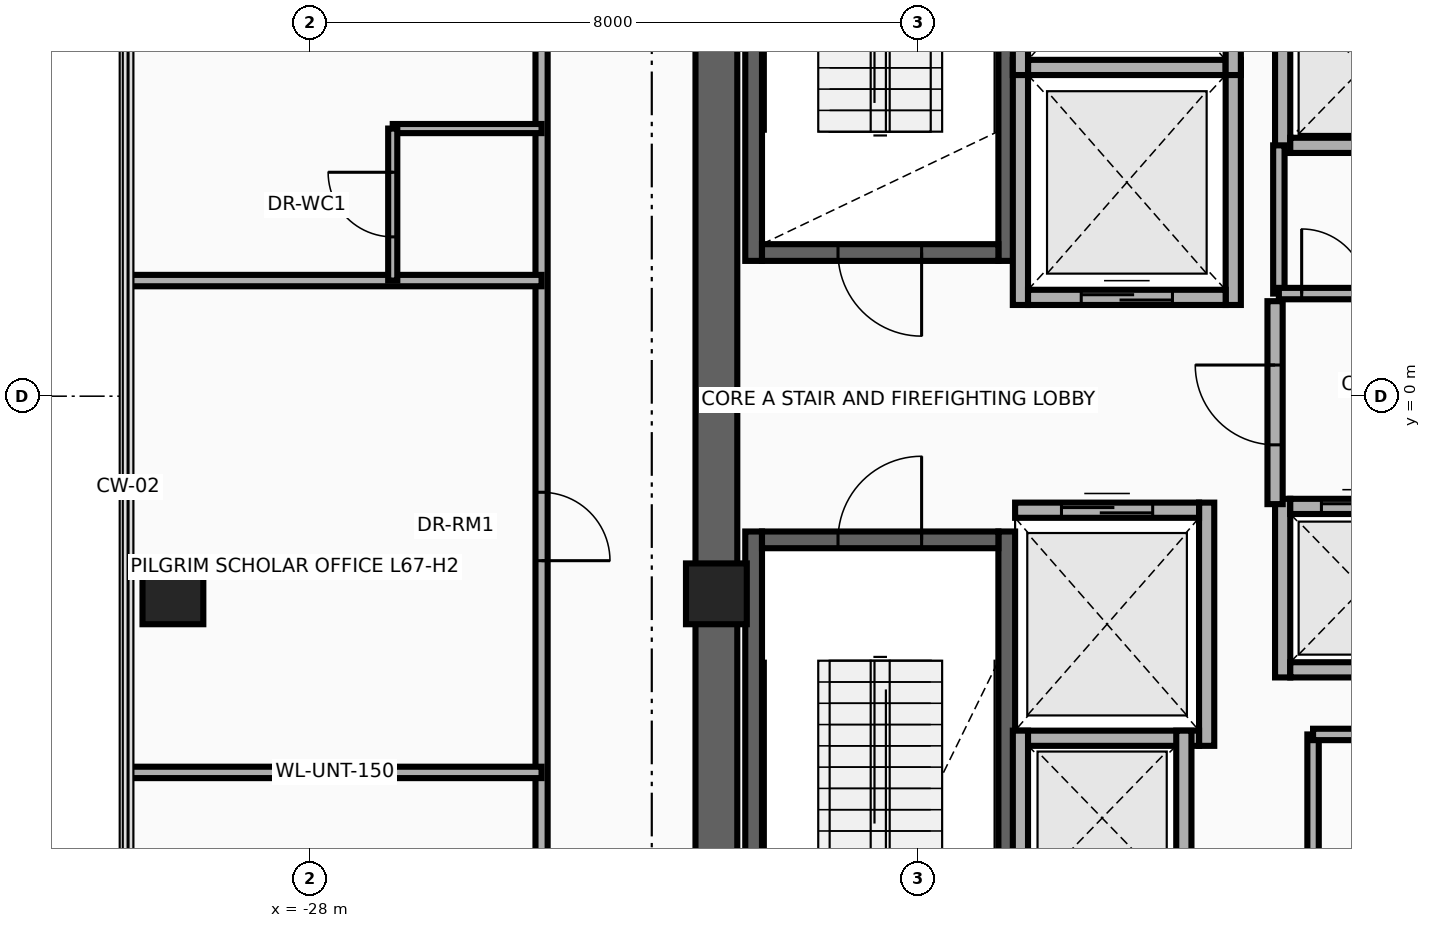
"""IFC4 building model, lengths in metres.
Left out: names, types, materials, properties, quantities, classifications, styles, units other than length and angle.
Written with IfcOpenShell. Run it as: python <this file> out.ifc"""

import sys

from ifc_helpers import new_model, si_unit, direction, frame, frame_2d, origin, origin_2d, place, context, subcontext, project, spatial, rectangle, extrude, source, transform, mapped, element, fill, save


model = new_model("IFC4")
c1 = context("Model", 3, precision=1e-05, world=origin(), true_north=direction((0.0, 1.0)))
c2 = subcontext(c1, "Body", "Model", "MODEL_VIEW")
j1 = project(units=[si_unit("LENGTHUNIT", "METRE"), si_unit("PLANEANGLEUNIT", "RADIAN")], contexts=[c1])
p1 = place(None, origin())
s1 = spatial("IfcSite", under=j1, at=p1, CompositionType="ELEMENT")
p2 = place(p1, origin())
s2 = spatial("IfcBuilding", under=s1, at=p2, CompositionType="ELEMENT")
p3 = place(p2, frame((0.0, 0.0, 258.0)))
s3 = spatial("IfcBuildingStorey", under=s2, at=p3, CompositionType="ELEMENT", Elevation=258.0)
for number, where, z_axis, x_axis in (
    (1, (-22.16, 1.78, 0.0), (0.0, 0.0, 1.0), (0.0, 1.0, 0.0)),
    (2, (-18.83, 1.78, 0.0), (0.0, 0.0, 1.0), (0.0, 1.0, 0.0)),
):
    element("IfcWall", number, at=place(p3, frame(where, z_axis=z_axis, x_axis=x_axis)), inside=s3, PredefinedType="SHEAR", context=c2, shape_type="SweptSolid", body=[
        extrude(rectangle(XDim=8.745, YDim=0.22, at=frame_2d((4.373, 0.0))), origin(), (0.0, 0.0, 1.0), 3.26),
    ])
p4 = place(p3, frame((-22.05, 1.89, 0.0), z_axis=(0.0, 0.0, 1.0), x_axis=(1.0, 0.0, 0.0)))
e3 = element("IfcWall", 3, at=p4, inside=s3, PredefinedType="SHEAR", context=c2, shape_type="SweptSolid", body=[
    extrude(rectangle(XDim=3.11, YDim=0.22, at=frame_2d((1.555, 0.0))), origin(), (0.0, 0.0, 1.0), 3.26),
])
p5 = place(p4, frame((1.0, 0.0, 0.0)))
e4 = element("IfcOpeningElement", 4, at=p5, cuts=e3, PredefinedType="OPENING", context=c2, shape_type="SweptSolid", body=[
    extrude(rectangle(XDim=1.1, YDim=2.15, at=frame_2d((0.55, 1.075))), frame((0.0, 0.125, 0.0), z_axis=(0.0, -1.0, 0.0), x_axis=(1.0, 0.0, 0.0)), (0.0, 0.0, 1.0), 0.25),
])
for number, where, z_axis, x_axis in (
    (5, (-22.16, -10.525, 0.0), (0.0, 0.0, 1.0), (0.0, 1.0, 0.0)),
    (6, (-18.83, -10.525, 0.0), (0.0, 0.0, 1.0), (0.0, 1.0, 0.0)),
):
    element("IfcWall", number, at=place(p3, frame(where, z_axis=z_axis, x_axis=x_axis)), inside=s3, PredefinedType="SHEAR", context=c2, shape_type="SweptSolid", body=[
        extrude(rectangle(XDim=8.745, YDim=0.22, at=frame_2d((4.373, 0.0))), origin(), (0.0, 0.0, 1.0), 3.26),
    ])
p6 = place(p3, frame((-22.05, -1.89, 0.0), z_axis=(0.0, 0.0, 1.0), x_axis=(1.0, 0.0, 0.0)))
e7 = element("IfcWall", 7, at=p6, inside=s3, PredefinedType="SHEAR", context=c2, shape_type="SweptSolid", body=[
    extrude(rectangle(XDim=3.11, YDim=0.22, at=frame_2d((1.555, 0.0))), origin(), (0.0, 0.0, 1.0), 3.26),
])
p7 = place(p6, frame((1.0, 0.0, 0.0)))
e8 = element("IfcOpeningElement", 8, at=p7, cuts=e7, PredefinedType="OPENING", context=c2, shape_type="SweptSolid", body=[
    extrude(rectangle(XDim=1.1, YDim=2.15, at=frame_2d((0.55, 1.075))), frame((0.0, 0.125, 0.0), z_axis=(0.0, -1.0, 0.0), x_axis=(1.0, 0.0, 0.0)), (0.0, 0.0, 1.0), 0.25),
])
p8 = place(p3, frame((-22.65, -11.075, 0.0), z_axis=(0.0, 0.0, 1.0), x_axis=(0.0, 1.0, 0.0)))
e9 = element("IfcWall", 9, at=p8, inside=s3, PredefinedType="SHEAR", context=c2, shape_type="SweptSolid", body=[
    extrude(rectangle(XDim=22.15, YDim=0.55, at=frame_2d((11.075, 0.0))), origin(), (0.0, 0.0, 1.0), 3.26),
])
m1 = source(origin(), c2, "Body", "SweptSolid", [
    extrude(rectangle(XDim=0.8, YDim=0.8, at=origin_2d()), origin(), (0.0, 0.0, 1.0), 3.5),
])
for number, where, z_axis, x_axis in (
    (10, (-29.8, -2.6, 0.0), (0.0, 0.0, 1.0), (1.0, 0.0, 0.0)),
    (11, (-22.65, -2.6, 0.0), (0.0, 0.0, 1.0), (1.0, 0.0, 0.0)),
):
    element("IfcColumn", number, at=place(p3, frame(where, z_axis=z_axis, x_axis=x_axis)), inside=s3, PredefinedType="COLUMN", context=c2, shape_type="MappedRepresentation", body=[
        mapped(m1, transform((0.0, 0.0, 0.0), x_axis=(1.0, 0.0, 0.0), y_axis=(0.0, 1.0, 0.0), z_axis=(0.0, 0.0, 1.0), scale=1.0)),
    ])
for number, where, z_axis, x_axis in (
    (12, (-18.65, 1.2, 0.0), (0.0, 0.0, 1.0), (0.0, 1.0, 0.0)),
    (13, (-15.85, 1.2, 0.0), (0.0, 0.0, 1.0), (0.0, 1.0, 0.0)),
):
    element("IfcWall", number, at=place(p3, frame(where, z_axis=z_axis, x_axis=x_axis)), inside=s3, PredefinedType="MOVABLE", context=c2, shape_type="SweptSolid", body=[
        extrude(rectangle(XDim=3.225, YDim=0.2, at=frame_2d((1.613, 0.0))), origin(), (0.0, 0.0, 1.0), 3.26),
    ])
p9 = place(p3, frame((-18.55, 1.3, 0.0), z_axis=(0.0, 0.0, 1.0), x_axis=(1.0, 0.0, 0.0)))
e14 = element("IfcWall", 14, at=p9, inside=s3, PredefinedType="MOVABLE", context=c2, shape_type="SweptSolid", body=[
    extrude(rectangle(XDim=2.6, YDim=0.2, at=frame_2d((1.3, 0.0))), origin(), (0.0, 0.0, 1.0), 3.26),
])
p10 = place(p9, frame((0.7, 0.0, 0.0)))
e15 = element("IfcOpeningElement", 15, at=p10, cuts=e14, PredefinedType="OPENING", context=c2, shape_type="SweptSolid", body=[
    extrude(rectangle(XDim=1.2, YDim=2.1, at=frame_2d((0.6, 1.05))), frame((0.0, 0.115, 0.0), z_axis=(0.0, -1.0, 0.0), x_axis=(1.0, 0.0, 0.0)), (0.0, 0.0, 1.0), 0.23),
])
p11 = place(p3, frame((-18.55, 4.325, 0.0), z_axis=(0.0, 0.0, 1.0), x_axis=(1.0, 0.0, 0.0)))
e16 = element("IfcWall", 16, at=p11, inside=s3, PredefinedType="MOVABLE", context=c2, shape_type="SweptSolid", body=[
    extrude(rectangle(XDim=2.6, YDim=0.2, at=frame_2d((1.3, 0.0))), origin(), (0.0, 0.0, 1.0), 3.26),
])
p12 = place(p3, frame((-16.2, -4.6, 0.0), z_axis=(0.0, 0.0, 1.0), x_axis=(0.0, 1.0, 0.0)))
e17 = element("IfcWall", 17, at=p12, inside=s3, PredefinedType="MOVABLE", context=c2, shape_type="SweptSolid", body=[
    extrude(rectangle(XDim=3.2, YDim=0.2, at=frame_2d((1.6, 0.0))), origin(), (0.0, 0.0, 1.0), 3.26),
])
p13 = place(p3, frame((-18.72, -4.5, 0.0), z_axis=(0.0, 0.0, 1.0), x_axis=(1.0, 0.0, 0.0)))
e18 = element("IfcWall", 18, at=p13, inside=s3, PredefinedType="MOVABLE", context=c2, shape_type="SweptSolid", body=[
    extrude(rectangle(XDim=2.42, YDim=0.2, at=frame_2d((1.21, 0.0))), origin(), (0.0, 0.0, 1.0), 3.26),
])
p14 = place(p3, frame((-18.72, -1.5, 0.0), z_axis=(0.0, 0.0, 1.0), x_axis=(1.0, 0.0, 0.0)))
e19 = element("IfcWall", 19, at=p14, inside=s3, PredefinedType="MOVABLE", context=c2, shape_type="SweptSolid", body=[
    extrude(rectangle(XDim=2.42, YDim=0.2, at=frame_2d((1.21, 0.0))), origin(), (0.0, 0.0, 1.0), 3.26),
])
p15 = place(p14, frame((0.61, 0.0, 0.0)))
e20 = element("IfcOpeningElement", 20, at=p15, cuts=e19, PredefinedType="OPENING", context=c2, shape_type="SweptSolid", body=[
    extrude(rectangle(XDim=1.2, YDim=2.1, at=frame_2d((0.6, 1.05))), frame((0.0, 0.115, 0.0), z_axis=(0.0, -1.0, 0.0), x_axis=(1.0, 0.0, 0.0)), (0.0, 0.0, 1.0), 0.23),
])
for number, where, z_axis, x_axis in (
    (21, (-18.65, 4.225, 0.0), (0.0, 0.0, 1.0), (0.0, 1.0, 0.0)),
    (22, (-15.85, 4.225, 0.0), (0.0, 0.0, 1.0), (0.0, 1.0, 0.0)),
):
    element("IfcWall", number, at=place(p3, frame(where, z_axis=z_axis, x_axis=x_axis)), inside=s3, PredefinedType="MOVABLE", context=c2, shape_type="SweptSolid", body=[
        extrude(rectangle(XDim=3.325, YDim=0.2, at=frame_2d((1.663, 0.0))), origin(), (0.0, 0.0, 1.0), 3.26),
    ])
p16 = place(p3, frame((-15.2, 3.2, 0.0), z_axis=(0.0, 0.0, 1.0), x_axis=(0.0, 1.0, 0.0)))
e23 = element("IfcWall", 23, at=p16, inside=s3, PredefinedType="MOVABLE", context=c2, shape_type="SweptSolid", body=[
    extrude(rectangle(XDim=2.25, YDim=0.2, at=frame_2d((1.125, 0.0))), origin(), (0.0, 0.0, 1.0), 3.26),
])
p17 = place(p3, frame((-15.1, 3.3, 0.0), z_axis=(0.0, 0.0, 1.0), x_axis=(1.0, 0.0, 0.0)))
e24 = element("IfcWall", 24, at=p17, inside=s3, PredefinedType="MOVABLE", context=c2, shape_type="SweptSolid", body=[
    extrude(rectangle(XDim=1.92, YDim=0.2, at=frame_2d((0.96, 0.0))), origin(), (0.0, 0.0, 1.0), 3.26),
])
for number, where, z_axis, x_axis in (
    (25, (-18.65, -6.7, 0.0), (0.0, 0.0, 1.0), (0.0, 1.0, 0.0)),
    (26, (-16.5, -6.7, 0.0), (0.0, 0.0, 1.0), (0.0, 1.0, 0.0)),
):
    element("IfcWall", number, at=place(p3, frame(where, z_axis=z_axis, x_axis=x_axis)), inside=s3, PredefinedType="MOVABLE", context=c2, shape_type="SweptSolid", body=[
        extrude(rectangle(XDim=2.3, YDim=0.2, at=frame_2d((1.15, 0.0))), origin(), (0.0, 0.0, 1.0), 3.26),
    ])
p18 = place(p3, frame((-15.2, -3.7, 0.0), z_axis=(0.0, 0.0, 1.0), x_axis=(0.0, 1.0, 0.0)))
e27 = element("IfcWall", 27, at=p18, inside=s3, PredefinedType="MOVABLE", context=c2, shape_type="SweptSolid", body=[
    extrude(rectangle(XDim=2.35, YDim=0.2, at=frame_2d((1.175, 0.0))), origin(), (0.0, 0.0, 1.0), 3.26),
])
p19 = place(p3, frame((-15.1, -3.6, 0.0), z_axis=(0.0, 0.0, 1.0), x_axis=(1.0, 0.0, 0.0)))
e28 = element("IfcWall", 28, at=p19, inside=s3, PredefinedType="MOVABLE", context=c2, shape_type="SweptSolid", body=[
    extrude(rectangle(XDim=1.92, YDim=0.2, at=frame_2d((0.96, 0.0))), origin(), (0.0, 0.0, 1.0), 3.26),
])
p20 = place(p3, frame((-15.1, -1.45, 0.0), z_axis=(0.0, 0.0, 1.0), x_axis=(1.0, 0.0, 0.0)))
e29 = element("IfcWall", 29, at=p20, inside=s3, PredefinedType="MOVABLE", context=c2, shape_type="SweptSolid", body=[
    extrude(rectangle(XDim=1.92, YDim=0.2, at=frame_2d((0.96, 0.0))), origin(), (0.0, 0.0, 1.0), 3.26),
])
p21 = place(p20, frame((0.41, 0.0, 0.0)))
e30 = element("IfcOpeningElement", 30, at=p21, cuts=e29, PredefinedType="OPENING", context=c2, shape_type="SweptSolid", body=[
    extrude(rectangle(XDim=1.1, YDim=2.1, at=frame_2d((0.55, 1.05))), frame((0.0, 0.115, 0.0), z_axis=(0.0, -1.0, 0.0), x_axis=(1.0, 0.0, 0.0)), (0.0, 0.0, 1.0), 0.23),
])
p22 = place(p3, frame((-15.3, -1.42, 0.0), z_axis=(0.0, 0.0, 1.0), x_axis=(0.0, 1.0, 0.0)))
e31 = element("IfcWall", 31, at=p22, inside=s3, PredefinedType="PARTITIONING", context=c2, shape_type="SweptSolid", body=[
    extrude(rectangle(XDim=2.67, YDim=0.2, at=frame_2d((1.335, 0.0))), origin(), (0.0, 0.0, 1.0), 3.26),
])
p23 = place(p22, frame((0.78, 0.0, 0.0)))
e32 = element("IfcOpeningElement", 32, at=p23, cuts=e31, PredefinedType="OPENING", context=c2, shape_type="SweptSolid", body=[
    extrude(rectangle(XDim=1.05, YDim=2.15, at=frame_2d((0.525, 1.075))), frame((0.0, 0.115, 0.0), z_axis=(0.0, -1.0, 0.0), x_axis=(1.0, 0.0, 0.0)), (0.0, 0.0, 1.0), 0.23),
])
p24 = place(p3, frame((-14.8, -6.58, 0.0), z_axis=(0.0, 0.0, 1.0), x_axis=(0.0, 1.0, 0.0)))
e33 = element("IfcWall", 33, at=p24, inside=s3, PredefinedType="PARTITIONING", context=c2, shape_type="SweptSolid", body=[
    extrude(rectangle(XDim=2.13, YDim=0.15, at=frame_2d((1.065, 0.0))), origin(), (0.0, 0.0, 1.0), 3.26),
])
p25 = place(p3, frame((-14.8, -4.45, 0.0), z_axis=(0.0, 0.0, 1.0), x_axis=(1.0, 0.0, 0.0)))
e34 = element("IfcWall", 34, at=p25, inside=s3, PredefinedType="PARTITIONING", context=c2, shape_type="SweptSolid", body=[
    extrude(rectangle(XDim=1.65, YDim=0.15, at=frame_2d((0.825, 0.0))), origin(), (0.0, 0.0, 1.0), 3.26),
])
p26 = place(p3, frame((-15.25, 1.35, 0.0), z_axis=(0.0, 0.0, 1.0), x_axis=(0.0, 1.0, 0.0)))
e35 = element("IfcWall", 35, at=p26, inside=s3, PredefinedType="PARTITIONING", context=c2, shape_type="SweptSolid", body=[
    extrude(rectangle(XDim=1.95, YDim=0.15, at=frame_2d((0.975, 0.0))), origin(), (0.0, 0.0, 1.0), 3.26),
])
p27 = place(p3, frame((-15.25, 1.35, 0.0), z_axis=(0.0, 0.0, 1.0), x_axis=(1.0, 0.0, 0.0)))
e36 = element("IfcWall", 36, at=p27, inside=s3, PredefinedType="PARTITIONING", context=c2, shape_type="SweptSolid", body=[
    extrude(rectangle(XDim=2.1, YDim=0.15, at=frame_2d((1.05, 0.0))), origin(), (0.0, 0.0, 1.0), 3.26),
])
p28 = place(p27, frame((0.3, 0.0, 0.0)))
e37 = element("IfcOpeningElement", 37, at=p28, cuts=e36, PredefinedType="OPENING", context=c2, shape_type="SweptSolid", body=[
    extrude(rectangle(XDim=0.85, YDim=2.05, at=frame_2d((0.425, 1.025))), frame((0.0, 0.09, 0.0), z_axis=(0.0, -1.0, 0.0), x_axis=(1.0, 0.0, 0.0)), (0.0, 0.0, 1.0), 0.18),
])
p29 = place(p3, frame((-24.95, -11.42, 0.0), z_axis=(0.0, 0.0, 1.0), x_axis=(0.0, 1.0, 0.0)))
e38 = element("IfcWall", 38, at=p29, inside=s3, PredefinedType="PARTITIONING", context=c2, shape_type="SweptSolid", body=[
    extrude(rectangle(XDim=20.22, YDim=0.16, at=frame_2d((10.11, 0.0))), origin(), (0.0, 0.0, 1.0), 2.623),
])
p30 = place(p29, frame((2.785, 0.0, 0.0)))
e39 = element("IfcOpeningElement", 39, at=p30, cuts=e38, PredefinedType="OPENING", context=c2, shape_type="SweptSolid", body=[
    extrude(rectangle(XDim=0.9, YDim=2.1, at=frame_2d((0.45, 1.05))), frame((0.0, 0.095, 0.0), z_axis=(0.0, -1.0, 0.0), x_axis=(1.0, 0.0, 0.0)), (0.0, 0.0, 1.0), 0.19),
])
p31 = place(p29, frame((9.256, 0.0, 0.0)))
e40 = element("IfcOpeningElement", 40, at=p31, cuts=e38, PredefinedType="OPENING", context=c2, shape_type="SweptSolid", body=[
    extrude(rectangle(XDim=0.9, YDim=2.1, at=frame_2d((0.45, 1.05))), frame((0.0, 0.095, 0.0), z_axis=(0.0, -1.0, 0.0), x_axis=(1.0, 0.0, 0.0)), (0.0, 0.0, 1.0), 0.19),
])
p32 = place(p29, frame((17.105, 0.0, 0.0)))
e41 = element("IfcOpeningElement", 41, at=p32, cuts=e38, PredefinedType="OPENING", context=c2, shape_type="SweptSolid", body=[
    extrude(rectangle(XDim=0.95, YDim=2.15, at=frame_2d((0.475, 1.075))), frame((0.0, 0.095, 0.0), z_axis=(0.0, -1.0, 0.0), x_axis=(1.0, 0.0, 0.0)), (0.0, 0.0, 1.0), 0.19),
])
for number, where, z_axis, x_axis in (
    (42, (-30.39, 1.521, 0.0), (0.0, 0.0, 1.0), (1.0, 0.0, 0.0)),
    (43, (-30.39, -4.949, 0.0), (0.0, 0.0, 1.0), (1.0, 0.0, 0.0)),
):
    element("IfcWall", number, at=place(p3, frame(where, z_axis=z_axis, x_axis=x_axis)), inside=s3, PredefinedType="PARTITIONING", context=c2, shape_type="SweptSolid", body=[
        extrude(rectangle(XDim=5.44, YDim=0.15, at=frame_2d((2.72, 0.0))), origin(), (0.0, 0.0, 1.0), 2.706),
    ])
p33 = place(p3, frame((-26.908, 3.521, 0.0), z_axis=(0.0, 0.0, 1.0), x_axis=(1.0, 0.0, 0.0)))
e44 = element("IfcWall", 44, at=p33, inside=s3, PredefinedType="PARTITIONING", context=c2, shape_type="SweptSolid", body=[
    extrude(rectangle(XDim=1.958, YDim=0.12, at=frame_2d((0.979, 0.0))), origin(), (0.0, 0.0, 1.0), 2.839),
])
p34 = place(p3, frame((-26.908, 1.521, 0.0), z_axis=(0.0, 0.0, 1.0), x_axis=(0.0, 1.0, 0.0)))
e45 = element("IfcWall", 45, at=p34, inside=s3, PredefinedType="PARTITIONING", context=c2, shape_type="SweptSolid", body=[
    extrude(rectangle(XDim=2.0, YDim=0.12, at=frame_2d((1.0, 0.0))), origin(), (0.0, 0.0, 1.0), 2.839),
])
p35 = place(p34, frame((0.575, 0.0, 0.0)))
e46 = element("IfcOpeningElement", 46, at=p35, cuts=e45, PredefinedType="OPENING", context=c2, shape_type="SweptSolid", body=[
    extrude(rectangle(XDim=0.85, YDim=2.1, at=frame_2d((0.425, 1.05))), frame((0.0, 0.075, 0.0), z_axis=(0.0, -1.0, 0.0), x_axis=(1.0, 0.0, 0.0)), (0.0, 0.0, 1.0), 0.15),
])
p36 = place(p10, origin())
e47 = element("IfcDoor", 47, at=p36, inside=s3, OperationType="DOUBLE_DOOR_SLIDING", PredefinedType="DOOR", context=c2, shape_type="SweptSolid", body=[
    extrude(rectangle(XDim=1.2, YDim=2.1, at=frame_2d((0.6, 1.05))), frame((0.0, 0.025, 0.0), z_axis=(0.0, -1.0, 0.0), x_axis=(1.0, 0.0, 0.0)), (0.0, 0.0, 1.0), 0.05),
])
fill(e15, e47)
p37 = place(p15, origin())
e48 = element("IfcDoor", 48, at=p37, inside=s3, OperationType="DOUBLE_DOOR_SLIDING", PredefinedType="DOOR", context=c2, shape_type="SweptSolid", body=[
    extrude(rectangle(XDim=1.2, YDim=2.1, at=frame_2d((0.6, 1.05))), frame((0.0, 0.025, 0.0), z_axis=(0.0, -1.0, 0.0), x_axis=(1.0, 0.0, 0.0)), (0.0, 0.0, 1.0), 0.05),
])
fill(e20, e48)
p38 = place(p21, origin())
e49 = element("IfcDoor", 49, at=p38, inside=s3, OperationType="DOUBLE_DOOR_SLIDING", PredefinedType="DOOR", context=c2, shape_type="SweptSolid", body=[
    extrude(rectangle(XDim=1.1, YDim=2.1, at=frame_2d((0.55, 1.05))), frame((0.0, 0.025, 0.0), z_axis=(0.0, -1.0, 0.0), x_axis=(1.0, 0.0, 0.0)), (0.0, 0.0, 1.0), 0.05),
])
fill(e30, e49)
p39 = place(p23, origin())
e50 = element("IfcDoor", 50, at=p39, inside=s3, OperationType="SINGLE_SWING_RIGHT", PredefinedType="DOOR", context=c2, shape_type="SweptSolid", body=[
    extrude(rectangle(XDim=1.05, YDim=2.15, at=frame_2d((0.525, 1.075))), frame((0.0, 0.025, 0.0), z_axis=(0.0, -1.0, 0.0), x_axis=(1.0, 0.0, 0.0)), (0.0, 0.0, 1.0), 0.05),
])
fill(e32, e50)
p40 = place(p5, frame((1.1, 0.0, 0.0), z_axis=(0.0, 0.0, 1.0), x_axis=(-1.0, 0.0, 0.0)))
e51 = element("IfcDoor", 51, at=p40, inside=s3, OperationType="SINGLE_SWING_LEFT", PredefinedType="DOOR", context=c2, shape_type="SweptSolid", body=[
    extrude(rectangle(XDim=1.1, YDim=2.15, at=frame_2d((0.55, 1.075))), frame((0.0, 0.025, 0.0), z_axis=(0.0, -1.0, 0.0), x_axis=(1.0, 0.0, 0.0)), (0.0, 0.0, 1.0), 0.05),
])
fill(e4, e51)
p41 = place(p7, origin())
e52 = element("IfcDoor", 52, at=p41, inside=s3, OperationType="SINGLE_SWING_RIGHT", PredefinedType="DOOR", context=c2, shape_type="SweptSolid", body=[
    extrude(rectangle(XDim=1.1, YDim=2.15, at=frame_2d((0.55, 1.075))), frame((0.0, 0.025, 0.0), z_axis=(0.0, -1.0, 0.0), x_axis=(1.0, 0.0, 0.0)), (0.0, 0.0, 1.0), 0.05),
])
fill(e8, e52)
p42 = place(p28, origin())
e53 = element("IfcDoor", 53, at=p42, inside=s3, OperationType="SINGLE_SWING_RIGHT", PredefinedType="DOOR", context=c2, shape_type="SweptSolid", body=[
    extrude(rectangle(XDim=0.85, YDim=2.05, at=frame_2d((0.425, 1.025))), frame((0.0, 0.025, 0.0), z_axis=(0.0, -1.0, 0.0), x_axis=(1.0, 0.0, 0.0)), (0.0, 0.0, 1.0), 0.05),
])
fill(e37, e53)
p43 = place(p31, frame((0.9, 0.0, 0.0), z_axis=(0.0, 0.0, 1.0), x_axis=(-1.0, 0.0, 0.0)))
e54 = element("IfcDoor", 54, at=p43, inside=s3, OperationType="SINGLE_SWING_LEFT", PredefinedType="DOOR", context=c2, shape_type="SweptSolid", body=[
    extrude(rectangle(XDim=0.9, YDim=2.1, at=frame_2d((0.45, 1.05))), frame((0.0, 0.025, 0.0), z_axis=(0.0, -1.0, 0.0), x_axis=(1.0, 0.0, 0.0)), (0.0, 0.0, 1.0), 0.05),
])
fill(e40, e54)
p44 = place(p35, origin())
e55 = element("IfcDoor", 55, at=p44, inside=s3, OperationType="SINGLE_SWING_LEFT", PredefinedType="DOOR", context=c2, shape_type="SweptSolid", body=[
    extrude(rectangle(XDim=0.85, YDim=2.1, at=frame_2d((0.425, 1.05))), frame((0.0, 0.025, 0.0), z_axis=(0.0, -1.0, 0.0), x_axis=(1.0, 0.0, 0.0)), (0.0, 0.0, 1.0), 0.05),
])
fill(e46, e55)
save(model, sys.argv[1])
